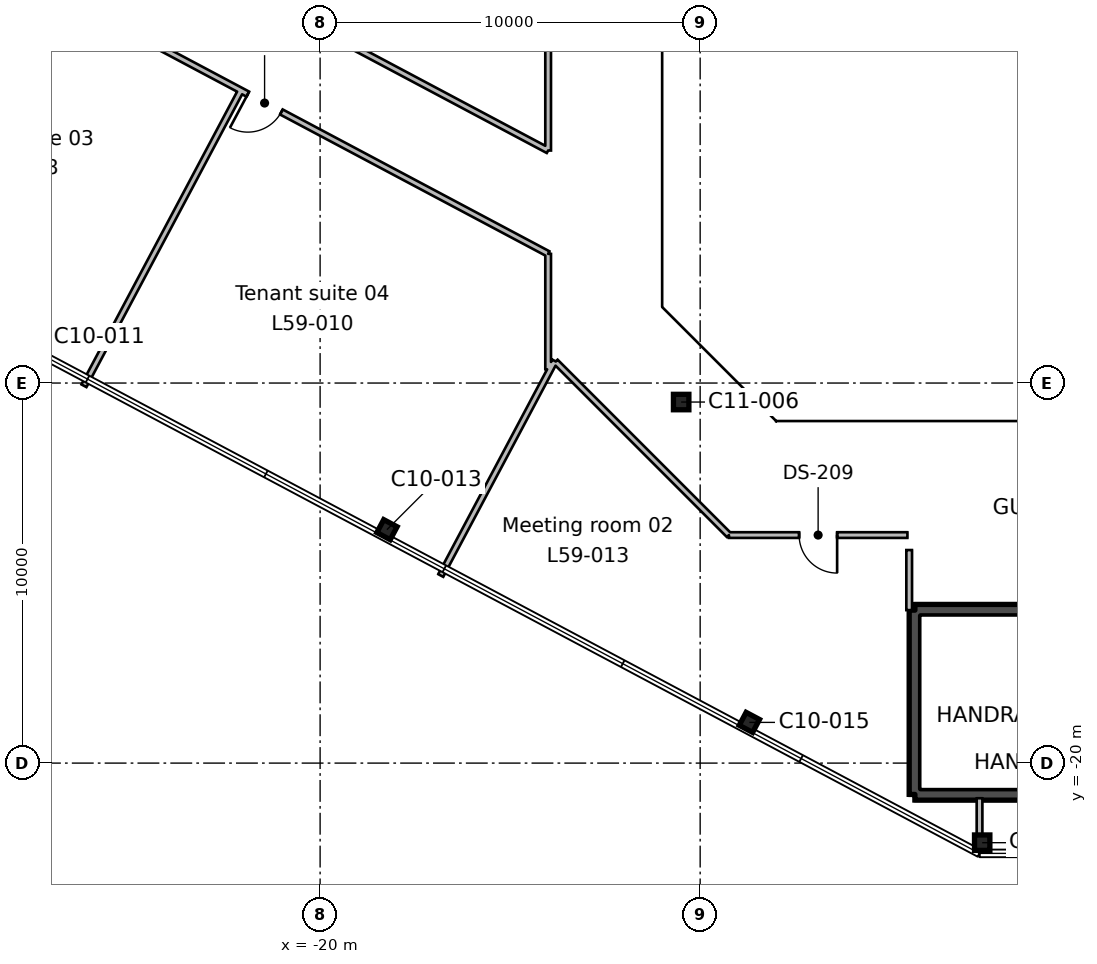
"""IFC4 building model, lengths in metres.
Left out: names, types, materials, properties, quantities, classifications, styles, units other than length and angle.
Written with IfcOpenShell. Run it as: python <this file> out.ifc"""

import sys

from ifc_helpers import new_model, si_unit, direction, frame, frame_2d, origin, origin_2d, place, context, subcontext, project, spatial, rectangle, hollow_rectangle, i_section, extrude, element, fill, save


model = new_model("IFC4")
c1 = context("Model", 3, precision=1e-05, world=origin(), true_north=direction((0.0, 1.0)))
c2 = subcontext(c1, "Body", "Model", "MODEL_VIEW")
j1 = project(units=[si_unit("LENGTHUNIT", "METRE"), si_unit("PLANEANGLEUNIT", "RADIAN")], contexts=[c1])
p1 = place(None, origin())
s1 = spatial("IfcSite", under=j1, at=p1, CompositionType="ELEMENT")
p2 = place(p1, origin())
s2 = spatial("IfcBuilding", under=s1, at=p2, CompositionType="ELEMENT")
p3 = place(p2, frame((0.0, 0.0, 265.8)))
s3 = spatial("IfcBuildingStorey", under=s2, at=p3, CompositionType="ELEMENT", Elevation=265.8)
p4 = place(p3, frame((-2.579, -22.094, 0.0), z_axis=(0.0, 0.0, 1.0), x_axis=(1.0, 0.0, 0.0)))
e1 = element("IfcColumn", 1, at=p4, inside=s3, PredefinedType="COLUMN", context=c2, shape_type="SweptSolid", body=[
    extrude(i_section(OverallWidth=0.404, OverallDepth=0.406, WebThickness=0.027, FlangeThickness=0.044, FilletRadius=0.015, at=origin_2d()), origin(), (0.0, 0.0, 1.0), 3.9),
])
for number, where, z_axis, x_axis in (
    (2, (-8.705, -18.929, 0.0), (0.0, 0.0, 1.0), (0.883, -0.469, 0.0)),
    (3, (-18.241, -13.858, 0.0), (0.0, 0.0, 1.0), (0.883, -0.469, 0.0)),
):
    element("IfcColumn", number, at=place(p3, frame(where, z_axis=z_axis, x_axis=x_axis)), inside=s3, PredefinedType="COLUMN", context=c2, shape_type="SweptSolid", body=[
        extrude(i_section(OverallWidth=0.399, OverallDepth=0.386, WebThickness=0.021, FlangeThickness=0.033, FilletRadius=0.015, at=origin_2d()), origin(), (0.0, 0.0, 1.0), 3.9),
    ])
p5 = place(p3, frame((-10.5, -10.5, 0.0), z_axis=(0.0, 0.0, 1.0), x_axis=(1.0, 0.0, 0.0)))
e4 = element("IfcColumn", 4, at=p5, inside=s3, PredefinedType="COLUMN", context=c2, shape_type="SweptSolid", body=[
    extrude(hollow_rectangle(XDim=0.406, YDim=0.406, WallThickness=0.009, InnerFilletRadius=0.004, OuterFilletRadius=0.013, at=origin_2d()), origin(), (0.0, 0.0, 1.0), 3.9),
])
p6 = place(p3, frame((3.95, -20.825, 0.0), z_axis=(0.0, 0.0, 1.0), x_axis=(-1.0, 0.0, 0.0)))
e5 = element("IfcWall", 5, at=p6, inside=s3, PredefinedType="SHEAR", context=c2, shape_type="SweptSolid", body=[
    extrude(rectangle(XDim=8.3, YDim=0.3, at=frame_2d((4.15, 0.0))), origin(), (0.0, 0.0, 1.0), 3.9),
])
p7 = place(p3, frame((-4.35, -20.825, 0.0), z_axis=(0.0, 0.0, 1.0), x_axis=(0.0, 1.0, 0.0)))
e6 = element("IfcWall", 6, at=p7, inside=s3, PredefinedType="SHEAR", context=c2, shape_type="SweptSolid", body=[
    extrude(rectangle(XDim=4.85, YDim=0.3, at=frame_2d((2.425, 0.0))), origin(), (0.0, 0.0, 1.0), 3.9),
])
p8 = place(p3, frame((-4.35, -15.975, 0.0), z_axis=(0.0, 0.0, 1.0), x_axis=(1.0, 0.0, 0.0)))
e7 = element("IfcWall", 7, at=p8, inside=s3, PredefinedType="SHEAR", context=c2, shape_type="SweptSolid", body=[
    extrude(rectangle(XDim=8.3, YDim=0.3, at=frame_2d((4.15, 0.0))), origin(), (0.0, 0.0, 1.0), 3.9),
])
p9 = place(p8, frame((6.05, 0.0, 0.0)))
e8 = element("IfcOpeningElement", 8, at=p9, cuts=e7, PredefinedType="OPENING", context=c2, shape_type="SweptSolid", body=[
    extrude(rectangle(XDim=1.9, YDim=2.1, at=frame_2d((0.95, 1.05))), frame((0.0, 0.16, 0.0), z_axis=(0.0, -1.0, 0.0), x_axis=(1.0, 0.0, 0.0)), (0.0, 0.0, 1.0), 0.32),
])
p10 = place(p3, frame((-14.0, -6.6, 0.0), z_axis=(0.0, 0.0, 1.0), x_axis=(-0.88294319167, 0.469479840125, 0.0)))
e9 = element("IfcWall", 9, at=p10, inside=s3, PredefinedType="PARTITIONING", context=c2, shape_type="SweptSolid", body=[
    extrude(rectangle(XDim=36.344, YDim=0.15, at=frame_2d((18.172, 0.0))), origin(), (0.0, 0.0, 1.0), 3.54),
])
p11 = place(p10, frame((25.35, 0.0, 0.0)))
e10 = element("IfcOpeningElement", 10, at=p11, cuts=e9, PredefinedType="OPENING", context=c2, shape_type="SweptSolid", body=[
    extrude(rectangle(XDim=1.0, YDim=2.1, at=frame_2d((0.5, 1.05))), frame((0.0, 0.085, 0.0), z_axis=(0.0, -1.0, 0.0), x_axis=(1.0, 0.0, 0.0)), (0.0, 0.0, 1.0), 0.17),
])
p12 = place(p10, frame((17.65, 0.0, 0.0)))
e11 = element("IfcOpeningElement", 11, at=p12, cuts=e9, PredefinedType="OPENING", context=c2, shape_type="SweptSolid", body=[
    extrude(rectangle(XDim=1.0, YDim=2.1, at=frame_2d((0.5, 1.05))), frame((0.0, 0.085, 0.0), z_axis=(0.0, -1.0, 0.0), x_axis=(1.0, 0.0, 0.0)), (0.0, 0.0, 1.0), 0.17),
])
p13 = place(p10, frame((7.95, 0.0, 0.0)))
e12 = element("IfcOpeningElement", 12, at=p13, cuts=e9, PredefinedType="OPENING", context=c2, shape_type="SweptSolid", body=[
    extrude(rectangle(XDim=1.0, YDim=2.1, at=frame_2d((0.5, 1.05))), frame((0.0, 0.085, 0.0), z_axis=(0.0, -1.0, 0.0), x_axis=(1.0, 0.0, 0.0)), (0.0, 0.0, 1.0), 0.17),
])
p14 = place(p3, frame((-22.083, -2.302, 0.0), z_axis=(0.0, 0.0, 1.0), x_axis=(-0.469445946219, -0.882961212952, 0.0)))
e13 = element("IfcWall", 13, at=p14, inside=s3, PredefinedType="PARTITIONING", context=c2, shape_type="SweptSolid", body=[
    extrude(rectangle(XDim=8.8, YDim=0.15, at=frame_2d((4.4, 0.0))), origin(), (0.0, 0.0, 1.0), 3.54),
])
p15 = place(p3, frame((-13.824, -9.419, 0.0), z_axis=(0.0, 0.0, 1.0), x_axis=(-0.469525578512, -0.882918870068, 0.0)))
e14 = element("IfcWall", 14, at=p15, inside=s3, PredefinedType="PARTITIONING", context=c2, shape_type="SweptSolid", body=[
    extrude(rectangle(XDim=6.394, YDim=0.15, at=frame_2d((3.197, 0.0))), origin(), (0.0, 0.0, 1.0), 3.54),
])
p16 = place(p3, frame((-14.0, -9.64, 0.0), z_axis=(0.0, 0.0, 1.0), x_axis=(0.0, 1.0, 0.0)))
e15 = element("IfcWall", 15, at=p16, inside=s3, PredefinedType="PARTITIONING", context=c2, shape_type="SweptSolid", body=[
    extrude(rectangle(XDim=3.04, YDim=0.15, at=frame_2d((1.52, 0.0))), origin(), (0.0, 0.0, 1.0), 3.54),
])
p17 = place(p3, frame((-4.546, -14.0, 0.0), z_axis=(0.0, 0.0, 1.0), x_axis=(-1.0, 0.0, 0.0)))
e16 = element("IfcWall", 16, at=p17, inside=s3, PredefinedType="PARTITIONING", context=c2, shape_type="SweptSolid", body=[
    extrude(rectangle(XDim=4.697, YDim=0.15, at=frame_2d((2.349, 0.0))), origin(), (0.0, 0.0, 1.0), 3.54),
])
p18 = place(p17, frame((1.85, 0.0, 0.0)))
e17 = element("IfcOpeningElement", 17, at=p18, cuts=e16, PredefinedType="OPENING", context=c2, shape_type="SweptSolid", body=[
    extrude(rectangle(XDim=1.0, YDim=2.1, at=frame_2d((0.5, 1.05))), frame((0.0, 0.085, 0.0), z_axis=(0.0, -1.0, 0.0), x_axis=(1.0, 0.0, 0.0)), (0.0, 0.0, 1.0), 0.17),
])
p19 = place(p3, frame((-9.243, -14.0, 0.0), z_axis=(0.0, 0.0, 1.0), x_axis=(-0.70703108598, 0.707182468291, 0.0)))
e18 = element("IfcWall", 18, at=p19, inside=s3, PredefinedType="PARTITIONING", context=c2, shape_type="SweptSolid", body=[
    extrude(rectangle(XDim=6.451, YDim=0.15, at=frame_2d((3.226, 0.0))), origin(), (0.0, 0.0, 1.0), 3.54),
])
p20 = place(p3, frame((-4.5, -15.975, 0.0), z_axis=(0.0, 0.0, 1.0), x_axis=(0.0, 1.0, 0.0)))
e19 = element("IfcWall", 19, at=p20, inside=s3, PredefinedType="PARTITIONING", context=c2, shape_type="SweptSolid", body=[
    extrude(rectangle(XDim=1.581, YDim=0.15, at=frame_2d((0.791, 0.0))), origin(), (0.0, 0.0, 1.0), 3.54),
])
p21 = place(p3, frame((-2.649, -20.925, 0.0), z_axis=(0.0, 0.0, 1.0), x_axis=(0.0, -1.0, 0.0)))
e20 = element("IfcWall", 20, at=p21, inside=s3, PredefinedType="PARTITIONING", context=c2, shape_type="SweptSolid", body=[
    extrude(rectangle(XDim=0.966, YDim=0.15, at=frame_2d((0.483, 0.0))), origin(), (0.0, 0.0, 1.0), 3.54),
])
p22 = place(p3, frame((-14.0, 9.243, 0.0), z_axis=(0.0, 0.0, 1.0), x_axis=(0.0, -1.0, 0.0)))
e21 = element("IfcWall", 21, at=p22, inside=s3, PredefinedType="PARTITIONING", context=c2, shape_type="SweptSolid", body=[
    extrude(rectangle(XDim=13.125, YDim=0.15, at=frame_2d((6.562, 0.0))), origin(), (0.0, 0.0, 1.0), 3.54),
])
p23 = place(p3, frame((-14.0, -3.882, 0.0), z_axis=(0.0, 0.0, 1.0), x_axis=(-0.882921917986, 0.469519847014, 0.0)))
e22 = element("IfcWall", 22, at=p23, inside=s3, PredefinedType="PARTITIONING", context=c2, shape_type="SweptSolid", body=[
    extrude(rectangle(XDim=7.261, YDim=0.15, at=frame_2d((3.63, 0.0))), origin(), (0.0, 0.0, 1.0), 3.54),
])
p24 = place(p13, origin())
e23 = element("IfcDoor", 23, at=p24, inside=s3, OperationType="SINGLE_SWING_RIGHT", PredefinedType="DOOR", context=c2, shape_type="SweptSolid", body=[
    extrude(rectangle(XDim=1.0, YDim=2.1, at=frame_2d((0.5, 1.05))), frame((0.0, 0.025, 0.0), z_axis=(0.0, -1.0, 0.0), x_axis=(1.0, 0.0, 0.0)), (0.0, 0.0, 1.0), 0.05),
])
fill(e12, e23)
p25 = place(p18, origin())
e24 = element("IfcDoor", 24, at=p25, inside=s3, OperationType="SINGLE_SWING_LEFT", PredefinedType="DOOR", context=c2, shape_type="SweptSolid", body=[
    extrude(rectangle(XDim=1.0, YDim=2.1, at=frame_2d((0.5, 1.05))), frame((0.0, 0.025, 0.0), z_axis=(0.0, -1.0, 0.0), x_axis=(1.0, 0.0, 0.0)), (0.0, 0.0, 1.0), 0.05),
])
fill(e17, e24)
save(model, sys.argv[1])
